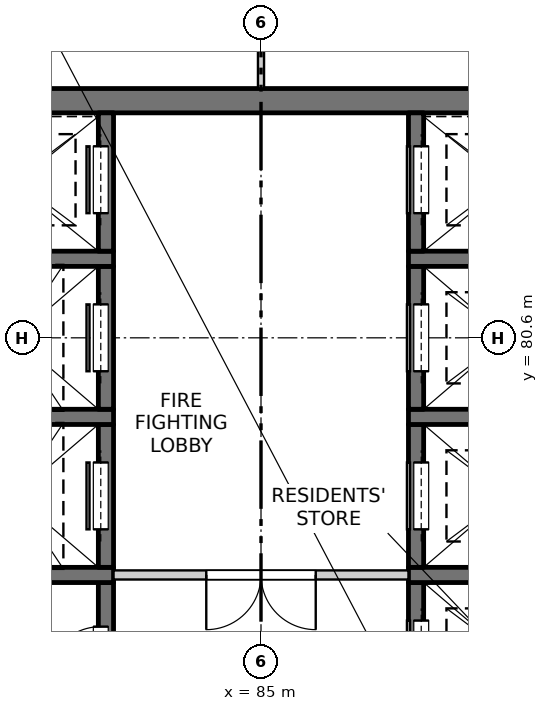
"""IFC4 building model, lengths in metres.
Left out: names, types, materials, properties, quantities, classifications, styles, units other than length and angle.
Written with IfcOpenShell. Run it as: python <this file> out.ifc"""

import sys

from ifc_helpers import new_model, si_unit, direction, frame, frame_2d, origin, place, context, subcontext, project, spatial, rectangle, extrude, element, fill, save


model = new_model("IFC4")
c1 = context("Model", 3, precision=1e-05, world=origin(), true_north=direction((0.0, 1.0)))
c2 = subcontext(c1, "Body", "Model", "MODEL_VIEW")
j1 = project(units=[si_unit("LENGTHUNIT", "METRE"), si_unit("PLANEANGLEUNIT", "RADIAN")], contexts=[c1])
p1 = place(None, origin())
s1 = spatial("IfcSite", under=j1, at=p1, CompositionType="ELEMENT")
p2 = place(p1, origin())
s2 = spatial("IfcBuilding", under=s1, at=p2, CompositionType="ELEMENT")
p3 = place(p2, frame((0.0, 0.0, 231.3)))
s3 = spatial("IfcBuildingStorey", under=s2, at=p3, CompositionType="ELEMENT", Elevation=231.3)
p4 = place(p3, frame((75.45, 84.5, -0.25), z_axis=(0.0, 0.0, 1.0), x_axis=(1.0, 0.0, 0.0)))
e1 = element("IfcWall", 1, at=p4, inside=s3, PredefinedType="SOLIDWALL", context=c2, shape_type="SweptSolid", body=[
    extrude(rectangle(XDim=19.1, YDim=0.4, at=frame_2d((9.55, 0.0))), origin(), (0.0, 0.0, 1.0), 3.4),
])
p5 = place(p3, frame((82.45, 74.225, -0.25), z_axis=(0.0, 0.0, 1.0), x_axis=(0.0, 1.0, 0.0)))
e2 = element("IfcWall", 2, at=p5, inside=s3, PredefinedType="SOLIDWALL", context=c2, shape_type="SweptSolid", body=[
    extrude(rectangle(XDim=2.35, YDim=0.25, at=frame_2d((1.175, 0.0))), origin(), (0.0, 0.0, 1.0), 3.4),
])
p6 = place(p5, frame((0.725, 0.0, 0.25)))
e3 = element("IfcOpeningElement", 3, at=p6, cuts=e2, PredefinedType="OPENING", context=c2, shape_type="SweptSolid", body=[
    extrude(rectangle(XDim=0.9, YDim=2.1, at=frame_2d((0.45, 1.05))), frame((0.0, 0.135, 0.0), z_axis=(0.0, -1.0, 0.0), x_axis=(1.0, 0.0, 0.0)), (0.0, 0.0, 1.0), 0.27),
])
p7 = place(p3, frame((79.575, 76.7, -0.25), z_axis=(0.0, 0.0, 1.0), x_axis=(1.0, 0.0, 0.0)))
e4 = element("IfcWall", 4, at=p7, inside=s3, PredefinedType="SOLIDWALL", context=c2, shape_type="SweptSolid", body=[
    extrude(rectangle(XDim=3.0, YDim=0.25, at=frame_2d((1.5, 0.0))), origin(), (0.0, 0.0, 1.0), 3.4),
])
p8 = place(p3, frame((82.45, 76.825, -0.25), z_axis=(0.0, 0.0, 1.0), x_axis=(0.0, 1.0, 0.0)))
e5 = element("IfcWall", 5, at=p8, inside=s3, PredefinedType="SOLIDWALL", context=c2, shape_type="SweptSolid", body=[
    extrude(rectangle(XDim=2.35, YDim=0.25, at=frame_2d((1.175, 0.0))), origin(), (0.0, 0.0, 1.0), 3.4),
])
p9 = place(p8, frame((0.625, 0.0, 0.25)))
e6 = element("IfcOpeningElement", 6, at=p9, cuts=e5, PredefinedType="OPENING", context=c2, shape_type="SweptSolid", body=[
    extrude(rectangle(XDim=1.1, YDim=2.1, at=frame_2d((0.55, 1.05))), frame((0.0, 0.135, 0.0), z_axis=(0.0, -1.0, 0.0), x_axis=(1.0, 0.0, 0.0)), (0.0, 0.0, 1.0), 0.27),
])
p10 = place(p3, frame((79.575, 79.3, -0.25), z_axis=(0.0, 0.0, 1.0), x_axis=(1.0, 0.0, 0.0)))
e7 = element("IfcWall", 7, at=p10, inside=s3, PredefinedType="SOLIDWALL", context=c2, shape_type="SweptSolid", body=[
    extrude(rectangle(XDim=3.0, YDim=0.25, at=frame_2d((1.5, 0.0))), origin(), (0.0, 0.0, 1.0), 3.4),
])
p11 = place(p3, frame((82.45, 79.425, -0.25), z_axis=(0.0, 0.0, 1.0), x_axis=(0.0, 1.0, 0.0)))
e8 = element("IfcWall", 8, at=p11, inside=s3, PredefinedType="SOLIDWALL", context=c2, shape_type="SweptSolid", body=[
    extrude(rectangle(XDim=2.35, YDim=0.25, at=frame_2d((1.175, 0.0))), origin(), (0.0, 0.0, 1.0), 3.4),
])
p12 = place(p11, frame((0.625, 0.0, 0.25)))
e9 = element("IfcOpeningElement", 9, at=p12, cuts=e8, PredefinedType="OPENING", context=c2, shape_type="SweptSolid", body=[
    extrude(rectangle(XDim=1.1, YDim=2.1, at=frame_2d((0.55, 1.05))), frame((0.0, 0.135, 0.0), z_axis=(0.0, -1.0, 0.0), x_axis=(1.0, 0.0, 0.0)), (0.0, 0.0, 1.0), 0.27),
])
p13 = place(p3, frame((79.575, 81.9, -0.25), z_axis=(0.0, 0.0, 1.0), x_axis=(1.0, 0.0, 0.0)))
e10 = element("IfcWall", 10, at=p13, inside=s3, PredefinedType="SOLIDWALL", context=c2, shape_type="SweptSolid", body=[
    extrude(rectangle(XDim=3.0, YDim=0.25, at=frame_2d((1.5, 0.0))), origin(), (0.0, 0.0, 1.0), 3.4),
])
p14 = place(p3, frame((82.45, 82.025, -0.25), z_axis=(0.0, 0.0, 1.0), x_axis=(0.0, 1.0, 0.0)))
e11 = element("IfcWall", 11, at=p14, inside=s3, PredefinedType="SOLIDWALL", context=c2, shape_type="SweptSolid", body=[
    extrude(rectangle(XDim=2.275, YDim=0.25, at=frame_2d((1.138, 0.0))), origin(), (0.0, 0.0, 1.0), 3.4),
])
p15 = place(p14, frame((0.625, 0.0, 0.25)))
e12 = element("IfcOpeningElement", 12, at=p15, cuts=e11, PredefinedType="OPENING", context=c2, shape_type="SweptSolid", body=[
    extrude(rectangle(XDim=1.1, YDim=2.1, at=frame_2d((0.55, 1.05))), frame((0.0, 0.135, 0.0), z_axis=(0.0, -1.0, 0.0), x_axis=(1.0, 0.0, 0.0)), (0.0, 0.0, 1.0), 0.27),
])
p16 = place(p3, frame((87.55, 74.225, -0.25), z_axis=(0.0, 0.0, 1.0), x_axis=(0.0, 1.0, 0.0)))
e13 = element("IfcWall", 13, at=p16, inside=s3, PredefinedType="SOLIDWALL", context=c2, shape_type="SweptSolid", body=[
    extrude(rectangle(XDim=2.35, YDim=0.25, at=frame_2d((1.175, 0.0))), origin(), (0.0, 0.0, 1.0), 3.4),
])
p17 = place(p16, frame((0.625, 0.0, 0.25)))
e14 = element("IfcOpeningElement", 14, at=p17, cuts=e13, PredefinedType="OPENING", context=c2, shape_type="SweptSolid", body=[
    extrude(rectangle(XDim=1.1, YDim=2.1, at=frame_2d((0.55, 1.05))), frame((0.0, 0.135, 0.0), z_axis=(0.0, -1.0, 0.0), x_axis=(1.0, 0.0, 0.0)), (0.0, 0.0, 1.0), 0.27),
])
p18 = place(p3, frame((87.425, 76.7, -0.25), z_axis=(0.0, 0.0, 1.0), x_axis=(1.0, 0.0, 0.0)))
e15 = element("IfcWall", 15, at=p18, inside=s3, PredefinedType="SOLIDWALL", context=c2, shape_type="SweptSolid", body=[
    extrude(rectangle(XDim=3.0, YDim=0.25, at=frame_2d((1.5, 0.0))), origin(), (0.0, 0.0, 1.0), 3.4),
])
p19 = place(p3, frame((87.55, 76.825, -0.25), z_axis=(0.0, 0.0, 1.0), x_axis=(0.0, 1.0, 0.0)))
e16 = element("IfcWall", 16, at=p19, inside=s3, PredefinedType="SOLIDWALL", context=c2, shape_type="SweptSolid", body=[
    extrude(rectangle(XDim=2.35, YDim=0.25, at=frame_2d((1.175, 0.0))), origin(), (0.0, 0.0, 1.0), 3.4),
])
p20 = place(p19, frame((0.625, 0.0, 0.25)))
e17 = element("IfcOpeningElement", 17, at=p20, cuts=e16, PredefinedType="OPENING", context=c2, shape_type="SweptSolid", body=[
    extrude(rectangle(XDim=1.1, YDim=2.1, at=frame_2d((0.55, 1.05))), frame((0.0, 0.135, 0.0), z_axis=(0.0, -1.0, 0.0), x_axis=(1.0, 0.0, 0.0)), (0.0, 0.0, 1.0), 0.27),
])
p21 = place(p3, frame((87.425, 79.3, -0.25), z_axis=(0.0, 0.0, 1.0), x_axis=(1.0, 0.0, 0.0)))
e18 = element("IfcWall", 18, at=p21, inside=s3, PredefinedType="SOLIDWALL", context=c2, shape_type="SweptSolid", body=[
    extrude(rectangle(XDim=3.0, YDim=0.25, at=frame_2d((1.5, 0.0))), origin(), (0.0, 0.0, 1.0), 3.4),
])
p22 = place(p3, frame((87.55, 79.425, -0.25), z_axis=(0.0, 0.0, 1.0), x_axis=(0.0, 1.0, 0.0)))
e19 = element("IfcWall", 19, at=p22, inside=s3, PredefinedType="SOLIDWALL", context=c2, shape_type="SweptSolid", body=[
    extrude(rectangle(XDim=2.35, YDim=0.25, at=frame_2d((1.175, 0.0))), origin(), (0.0, 0.0, 1.0), 3.4),
])
p23 = place(p22, frame((0.625, 0.0, 0.25)))
e20 = element("IfcOpeningElement", 20, at=p23, cuts=e19, PredefinedType="OPENING", context=c2, shape_type="SweptSolid", body=[
    extrude(rectangle(XDim=1.1, YDim=2.1, at=frame_2d((0.55, 1.05))), frame((0.0, 0.135, 0.0), z_axis=(0.0, -1.0, 0.0), x_axis=(1.0, 0.0, 0.0)), (0.0, 0.0, 1.0), 0.27),
])
p24 = place(p3, frame((87.425, 81.9, -0.25), z_axis=(0.0, 0.0, 1.0), x_axis=(1.0, 0.0, 0.0)))
e21 = element("IfcWall", 21, at=p24, inside=s3, PredefinedType="SOLIDWALL", context=c2, shape_type="SweptSolid", body=[
    extrude(rectangle(XDim=3.0, YDim=0.25, at=frame_2d((1.5, 0.0))), origin(), (0.0, 0.0, 1.0), 3.4),
])
p25 = place(p3, frame((87.55, 82.025, -0.25), z_axis=(0.0, 0.0, 1.0), x_axis=(0.0, 1.0, 0.0)))
e22 = element("IfcWall", 22, at=p25, inside=s3, PredefinedType="SOLIDWALL", context=c2, shape_type="SweptSolid", body=[
    extrude(rectangle(XDim=2.275, YDim=0.25, at=frame_2d((1.138, 0.0))), origin(), (0.0, 0.0, 1.0), 3.4),
])
p26 = place(p25, frame((0.625, 0.0, 0.25)))
e23 = element("IfcOpeningElement", 23, at=p26, cuts=e22, PredefinedType="OPENING", context=c2, shape_type="SweptSolid", body=[
    extrude(rectangle(XDim=1.1, YDim=2.1, at=frame_2d((0.55, 1.05))), frame((0.0, 0.135, 0.0), z_axis=(0.0, -1.0, 0.0), x_axis=(1.0, 0.0, 0.0)), (0.0, 0.0, 1.0), 0.27),
])
p27 = place(p3, frame((82.575, 76.7, 0.0), z_axis=(0.0, 0.0, 1.0), x_axis=(1.0, 0.0, 0.0)))
e24 = element("IfcWall", 24, at=p27, inside=s3, PredefinedType="PARTITIONING", context=c2, shape_type="SweptSolid", body=[
    extrude(rectangle(XDim=4.85, YDim=0.15, at=frame_2d((2.425, 0.0))), origin(), (0.0, 0.0, 1.0), 3.15),
])
p28 = place(p27, frame((1.525, 0.0, 0.0)))
e25 = element("IfcOpeningElement", 25, at=p28, cuts=e24, PredefinedType="OPENING", context=c2, shape_type="SweptSolid", body=[
    extrude(rectangle(XDim=1.8, YDim=2.1, at=frame_2d((0.9, 1.05))), frame((0.0, 0.085, 0.0), z_axis=(0.0, -1.0, 0.0), x_axis=(1.0, 0.0, 0.0)), (0.0, 0.0, 1.0), 0.17),
])
p29 = place(p3, frame((85.0, 84.7, 0.0), z_axis=(0.0, 0.0, 1.0), x_axis=(0.0, 1.0, 0.0)))
e26 = element("IfcWall", 26, at=p29, inside=s3, PredefinedType="PARTITIONING", context=c2, shape_type="SweptSolid", body=[
    extrude(rectangle(XDim=3.4, YDim=0.1, at=frame_2d((1.7, 0.0))), origin(), (0.0, 0.0, 1.0), 3.15),
])
p30 = place(p29, frame((1.3, 0.0, 0.0)))
e27 = element("IfcOpeningElement", 27, at=p30, cuts=e26, PredefinedType="OPENING", context=c2, shape_type="SweptSolid", body=[
    extrude(rectangle(XDim=0.9, YDim=2.1, at=frame_2d((0.45, 1.05))), frame((0.0, 0.06, 0.0), z_axis=(0.0, -1.0, 0.0), x_axis=(1.0, 0.0, 0.0)), (0.0, 0.0, 1.0), 0.12),
])
p31 = place(p6, origin())
e28 = element("IfcDoor", 28, at=p31, inside=s3, OperationType="SINGLE_SWING_LEFT", PredefinedType="DOOR", context=c2, shape_type="SweptSolid", body=[
    extrude(rectangle(XDim=0.9, YDim=2.1, at=frame_2d((0.45, 1.05))), frame((0.0, 0.11, 0.0), z_axis=(0.0, -1.0, 0.0), x_axis=(1.0, 0.0, 0.0)), (0.0, 0.0, 1.0), 0.05),
])
fill(e3, e28)
p32 = place(p17, origin())
e29 = element("IfcDoor", 29, at=p32, inside=s3, OperationType="SLIDING_TO_LEFT", PredefinedType="DOOR", context=c2, shape_type="SweptSolid", body=[
    extrude(rectangle(XDim=1.1, YDim=2.1, at=frame_2d((0.55, 1.05))), frame((0.0, -0.06, 0.0), z_axis=(0.0, -1.0, 0.0), x_axis=(1.0, 0.0, 0.0)), (0.0, 0.0, 1.0), 0.05),
])
fill(e14, e29)
p33 = place(p28, origin())
e30 = element("IfcDoor", 30, at=p33, inside=s3, OperationType="DOUBLE_DOOR_SINGLE_SWING", PredefinedType="DOOR", context=c2, shape_type="SweptSolid", body=[
    extrude(rectangle(XDim=1.8, YDim=2.1, at=frame_2d((0.9, 1.05))), frame((0.0, 0.025, 0.0), z_axis=(0.0, -1.0, 0.0), x_axis=(1.0, 0.0, 0.0)), (0.0, 0.0, 1.0), 0.05),
])
fill(e25, e30)
p34 = place(p9, origin())
e31 = element("IfcDoor", 31, at=p34, inside=s3, OperationType="SLIDING_TO_LEFT", PredefinedType="DOOR", context=c2, shape_type="SweptSolid", body=[
    extrude(rectangle(XDim=1.1, YDim=2.1, at=frame_2d((0.55, 1.05))), frame((0.0, 0.11, 0.0), z_axis=(0.0, -1.0, 0.0), x_axis=(1.0, 0.0, 0.0)), (0.0, 0.0, 1.0), 0.05),
])
fill(e6, e31)
p35 = place(p20, origin())
e32 = element("IfcDoor", 32, at=p35, inside=s3, OperationType="SLIDING_TO_LEFT", PredefinedType="DOOR", context=c2, shape_type="SweptSolid", body=[
    extrude(rectangle(XDim=1.1, YDim=2.1, at=frame_2d((0.55, 1.05))), frame((0.0, -0.06, 0.0), z_axis=(0.0, -1.0, 0.0), x_axis=(1.0, 0.0, 0.0)), (0.0, 0.0, 1.0), 0.05),
])
fill(e17, e32)
p36 = place(p12, origin())
e33 = element("IfcDoor", 33, at=p36, inside=s3, OperationType="SLIDING_TO_LEFT", PredefinedType="DOOR", context=c2, shape_type="SweptSolid", body=[
    extrude(rectangle(XDim=1.1, YDim=2.1, at=frame_2d((0.55, 1.05))), frame((0.0, 0.11, 0.0), z_axis=(0.0, -1.0, 0.0), x_axis=(1.0, 0.0, 0.0)), (0.0, 0.0, 1.0), 0.05),
])
fill(e9, e33)
p37 = place(p23, origin())
e34 = element("IfcDoor", 34, at=p37, inside=s3, OperationType="SLIDING_TO_RIGHT", PredefinedType="DOOR", context=c2, shape_type="SweptSolid", body=[
    extrude(rectangle(XDim=1.1, YDim=2.1, at=frame_2d((0.55, 1.05))), frame((0.0, -0.06, 0.0), z_axis=(0.0, -1.0, 0.0), x_axis=(1.0, 0.0, 0.0)), (0.0, 0.0, 1.0), 0.05),
])
fill(e20, e34)
p38 = place(p15, origin())
e35 = element("IfcDoor", 35, at=p38, inside=s3, OperationType="SLIDING_TO_RIGHT", PredefinedType="DOOR", context=c2, shape_type="SweptSolid", body=[
    extrude(rectangle(XDim=1.1, YDim=2.1, at=frame_2d((0.55, 1.05))), frame((0.0, 0.11, 0.0), z_axis=(0.0, -1.0, 0.0), x_axis=(1.0, 0.0, 0.0)), (0.0, 0.0, 1.0), 0.05),
])
fill(e12, e35)
p39 = place(p26, origin())
e36 = element("IfcDoor", 36, at=p39, inside=s3, OperationType="SLIDING_TO_RIGHT", PredefinedType="DOOR", context=c2, shape_type="SweptSolid", body=[
    extrude(rectangle(XDim=1.1, YDim=2.1, at=frame_2d((0.55, 1.05))), frame((0.0, -0.06, 0.0), z_axis=(0.0, -1.0, 0.0), x_axis=(1.0, 0.0, 0.0)), (0.0, 0.0, 1.0), 0.05),
])
fill(e23, e36)
save(model, sys.argv[1])
